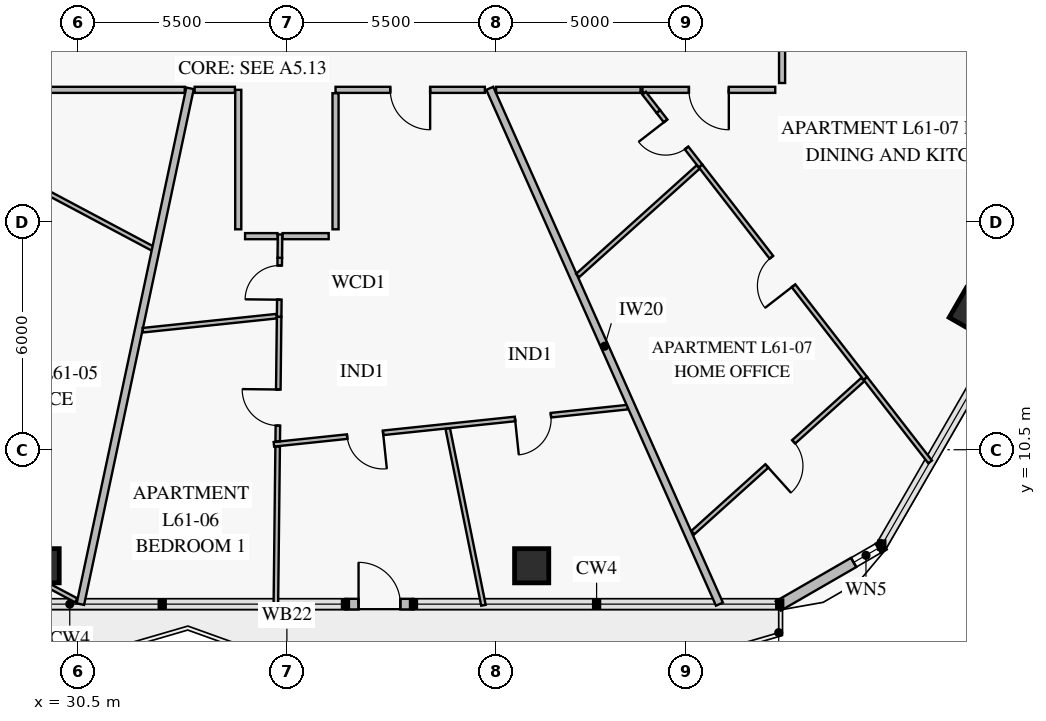
"""IFC4 building model, lengths in metres.
Left out: names, types, materials, properties, quantities, classifications, styles, units other than length and angle.
Written with IfcOpenShell. Run it as: python <this file> out.ifc"""

import sys

from ifc_helpers import new_model, si_unit, direction, frame, frame_2d, origin, origin_2d, place, context, subcontext, project, spatial, rectangle, extrude, element, fill, save


model = new_model("IFC4")
c1 = context("Model", 3, precision=1e-05, world=origin(), true_north=direction((0.0, 1.0)))
c2 = subcontext(c1, "Body", "Model", "MODEL_VIEW")
j1 = project(units=[si_unit("LENGTHUNIT", "METRE"), si_unit("PLANEANGLEUNIT", "RADIAN")], contexts=[c1])
p1 = place(None, origin())
s1 = spatial("IfcSite", under=j1, at=p1, CompositionType="ELEMENT")
p2 = place(p1, origin())
s2 = spatial("IfcBuilding", under=s1, at=p2, CompositionType="ELEMENT")
p3 = place(p2, frame((0.0, 0.0, 242.6)))
s3 = spatial("IfcBuildingStorey", under=s2, at=p3, CompositionType="ELEMENT", Elevation=242.6)
for number, where, z_axis, x_axis in (
    (1, (29.559, 7.446, 0.0), (0.0, 0.0, 1.0), (1.0, 0.0, 0.0)),
    (2, (42.441, 7.446, 0.0), (0.0, 0.0, 1.0), (1.0, 0.0, 0.0)),
    (3, (54.044, 14.145, 0.0), (0.0, 0.0, 1.0), (0.5, 0.866, 0.0)),
):
    element("IfcColumn", number, at=place(p3, frame(where, z_axis=z_axis, x_axis=x_axis)), inside=s3, PredefinedType="COLUMN", context=c2, shape_type="SweptSolid", body=[
        extrude(rectangle(XDim=0.9, YDim=0.9, at=origin_2d()), origin(), (0.0, 0.0, 1.0), 3.55),
    ])
p4 = place(p3, frame((51.715, 7.996, 0.0), z_axis=(0.0, 0.0, 1.0), x_axis=(-0.866028773314, -0.499994163758, 0.0)))
e4 = element("IfcWall", 4, at=p4, inside=s3, PredefinedType="SOLIDWALL", context=c2, shape_type="SweptSolid", body=[
    extrude(rectangle(XDim=3.215, YDim=0.28, at=frame_2d((1.607, 0.0))), origin(), (0.0, 0.0, 1.0), 3.55),
])
p5 = place(p4, frame((0.176, 0.0, 0.85)))
e5 = element("IfcOpeningElement", 5, at=p5, cuts=e4, PredefinedType="OPENING", context=c2, shape_type="SweptSolid", body=[
    extrude(rectangle(XDim=0.75, YDim=1.5, at=frame_2d((0.375, 0.75))), frame((0.0, 0.152, 0.0), z_axis=(0.0, -1.0, 0.0), x_axis=(1.0, 0.0, 0.0)), (0.0, 0.0, 1.0), 0.304),
])
p6 = place(p3, frame((39.331, 6.436, 0.0), z_axis=(0.0, 0.0, 1.0), x_axis=(-1.0, 0.0, 0.0)))
e6 = element("IfcWall", 6, at=p6, inside=s3, PredefinedType="SOLIDWALL", context=c2, shape_type="SweptSolid", body=[
    extrude(rectangle(XDim=1.79, YDim=0.28, at=frame_2d((0.895, 0.0))), origin(), (0.0, 0.0, 1.0), 3.55),
])
p7 = place(p6, frame((0.345, 0.0, 0.0)))
e7 = element("IfcOpeningElement", 7, at=p7, cuts=e6, PredefinedType="OPENING", context=c2, shape_type="SweptSolid", body=[
    extrude(rectangle(XDim=1.1, YDim=2.2, at=frame_2d((0.55, 1.1))), frame((0.0, 0.152, 0.0), z_axis=(0.0, -1.0, 0.0), x_axis=(1.0, 0.0, 0.0)), (0.0, 0.0, 1.0), 0.304),
])
p8 = place(p3, frame((35.658, 10.642, 0.0), z_axis=(0.0, 0.0, 1.0), x_axis=(0.994519444743, 0.104551776778, 0.0)))
e8 = element("IfcWall", 8, at=p8, inside=s3, PredefinedType="PARTITIONING", context=c2, shape_type="SweptSolid", body=[
    extrude(rectangle(XDim=9.364, YDim=0.12, at=frame_2d((4.682, 0.0))), origin(), (0.0, 0.0, 1.0), 2.95),
])
p9 = place(p8, frame((1.939, 0.0, 0.0)))
e9 = element("IfcOpeningElement", 9, at=p9, cuts=e8, PredefinedType="OPENING", context=c2, shape_type="SweptSolid", body=[
    extrude(rectangle(XDim=0.95, YDim=2.1, at=frame_2d((0.475, 1.05))), frame((0.0, 0.072, 0.0), z_axis=(0.0, -1.0, 0.0), x_axis=(1.0, 0.0, 0.0)), (0.0, 0.0, 1.0), 0.144),
])
p10 = place(p8, frame((6.38, 0.0, 0.0)))
e10 = element("IfcOpeningElement", 10, at=p10, cuts=e8, PredefinedType="OPENING", context=c2, shape_type="SweptSolid", body=[
    extrude(rectangle(XDim=0.95, YDim=2.1, at=frame_2d((0.475, 1.05))), frame((0.0, 0.072, 0.0), z_axis=(0.0, -1.0, 0.0), x_axis=(1.0, 0.0, 0.0)), (0.0, 0.0, 1.0), 0.144),
])
p11 = place(p3, frame((35.813, 15.55, 0.0), z_axis=(0.0, 0.0, 1.0), x_axis=(-0.011312915226, -0.999936006927, 0.0)))
e11 = element("IfcWall", 11, at=p11, inside=s3, PredefinedType="PARTITIONING", context=c2, shape_type="SweptSolid", body=[
    extrude(rectangle(XDim=1.554, YDim=0.12, at=frame_2d((0.777, 0.0))), origin(), (0.0, 0.0, 1.0), 3.15),
])
p12 = place(p11, frame((0.203, 0.0, 0.0)))
e12 = element("IfcOpeningElement", 12, at=p12, cuts=e11, PredefinedType="OPENING", context=c2, shape_type="SweptSolid", body=[
    extrude(rectangle(XDim=0.9, YDim=2.1, at=frame_2d((0.45, 1.05))), frame((0.0, 0.072, 0.0), z_axis=(0.0, -1.0, 0.0), x_axis=(1.0, 0.0, 0.0)), (0.0, 0.0, 1.0), 0.144),
])
p13 = place(p3, frame((35.796, 13.996, 0.0), z_axis=(0.0, 0.0, 1.0), x_axis=(-0.011329872819, -0.999935814931, 0.0)))
e13 = element("IfcWall", 13, at=p13, inside=s3, PredefinedType="PARTITIONING", context=c2, shape_type="SweptSolid", body=[
    extrude(rectangle(XDim=3.275, YDim=0.12, at=frame_2d((1.638, 0.0))), origin(), (0.0, 0.0, 1.0), 3.55),
])
p14 = place(p13, frame((1.912, 0.0, 0.0)))
e14 = element("IfcOpeningElement", 14, at=p14, cuts=e13, PredefinedType="OPENING", context=c2, shape_type="SweptSolid", body=[
    extrude(rectangle(XDim=0.95, YDim=2.1, at=frame_2d((0.475, 1.05))), frame((0.0, 0.072, 0.0), z_axis=(0.0, -1.0, 0.0), x_axis=(1.0, 0.0, 0.0)), (0.0, 0.0, 1.0), 0.144),
])
p15 = place(p3, frame((35.757, 10.584, 0.0), z_axis=(0.0, 0.0, 1.0), x_axis=(-0.011345536626, -0.999935637328, 0.0)))
e15 = element("IfcWall", 15, at=p15, inside=s3, PredefinedType="PARTITIONING", context=c2, shape_type="SweptSolid", body=[
    extrude(rectangle(XDim=4.153, YDim=0.12, at=frame_2d((2.077, 0.0))), origin(), (0.0, 0.0, 1.0), 2.93),
])
p16 = place(p3, frame((37.28, 19.97, 0.0), z_axis=(0.0, 0.0, 1.0), x_axis=(1.0, 0.0, 0.0)))
e16 = element("IfcWall", 16, at=p16, inside=s3, PredefinedType="PARTITIONING", context=c2, shape_type="SweptSolid", body=[
    extrude(rectangle(XDim=3.929, YDim=0.16, at=frame_2d((1.964, 0.0))), origin(), (0.0, 0.0, 1.0), 2.95),
])
p17 = place(p16, frame((1.439, 0.0, 0.0)))
e17 = element("IfcOpeningElement", 17, at=p17, cuts=e16, PredefinedType="OPENING", context=c2, shape_type="SweptSolid", body=[
    extrude(rectangle(XDim=1.05, YDim=2.15, at=frame_2d((0.525, 1.075))), frame((0.0, 0.092, 0.0), z_axis=(0.0, -1.0, 0.0), x_axis=(1.0, 0.0, 0.0)), (0.0, 0.0, 1.0), 0.184),
])
p18 = place(p3, frame((45.773, 19.4, 0.0), z_axis=(0.0, 0.0, 1.0), x_axis=(0.612972513082, -0.790104232495, 0.0)))
e18 = element("IfcWall", 18, at=p18, inside=s3, PredefinedType="PARTITIONING", context=c2, shape_type="SweptSolid", body=[
    extrude(rectangle(XDim=1.817, YDim=0.12, at=frame_2d((0.908, 0.0))), origin(), (0.0, 0.0, 1.0), 3.55),
])
p19 = place(p18, frame((0.313, 0.0, 0.0)))
e19 = element("IfcOpeningElement", 19, at=p19, cuts=e18, PredefinedType="OPENING", context=c2, shape_type="SweptSolid", body=[
    extrude(rectangle(XDim=0.9, YDim=2.1, at=frame_2d((0.45, 1.05))), frame((0.0, 0.072, 0.0), z_axis=(0.0, -1.0, 0.0), x_axis=(1.0, 0.0, 0.0)), (0.0, 0.0, 1.0), 0.144),
])
p20 = place(p3, frame((46.887, 17.965, 0.0), z_axis=(0.0, 0.0, 1.0), x_axis=(0.612896077685, -0.790163526087, 0.0)))
e20 = element("IfcWall", 20, at=p20, inside=s3, PredefinedType="PARTITIONING", context=c2, shape_type="SweptSolid", body=[
    extrude(rectangle(XDim=7.075, YDim=0.12, at=frame_2d((3.538, 0.0))), origin(), (0.0, 0.0, 1.0), 2.93),
])
p21 = place(p20, frame((3.038, 0.0, 0.0)))
e21 = element("IfcOpeningElement", 21, at=p21, cuts=e20, PredefinedType="OPENING", context=c2, shape_type="SweptSolid", body=[
    extrude(rectangle(XDim=0.95, YDim=2.1, at=frame_2d((0.475, 1.05))), frame((0.0, 0.072, 0.0), z_axis=(0.0, -1.0, 0.0), x_axis=(1.0, 0.0, 0.0)), (0.0, 0.0, 1.0), 0.144),
])
p22 = place(p3, frame((46.682, 8.319, 0.0), z_axis=(0.0, 0.0, 1.0), x_axis=(0.743153013224, 0.669121512834, 0.0)))
e22 = element("IfcWall", 22, at=p22, inside=s3, PredefinedType="PARTITIONING", context=c2, shape_type="SweptSolid", body=[
    extrude(rectangle(XDim=6.022, YDim=0.12, at=frame_2d((3.011, 0.0))), origin(), (0.0, 0.0, 1.0), 2.93),
])
p23 = place(p22, frame((2.62, 0.0, 0.0)))
e23 = element("IfcOpeningElement", 23, at=p23, cuts=e22, PredefinedType="OPENING", context=c2, shape_type="SweptSolid", body=[
    extrude(rectangle(XDim=0.95, YDim=2.1, at=frame_2d((0.475, 1.05))), frame((0.0, 0.072, 0.0), z_axis=(0.0, -1.0, 0.0), x_axis=(1.0, 0.0, 0.0)), (0.0, 0.0, 1.0), 0.144),
])
p24 = place(p3, frame((45.357, 19.97, 0.0), z_axis=(0.0, 0.0, 1.0), x_axis=(1.0, 0.0, 0.0)))
e24 = element("IfcWall", 24, at=p24, inside=s3, PredefinedType="PARTITIONING", context=c2, shape_type="SweptSolid", body=[
    extrude(rectangle(XDim=3.493, YDim=0.16, at=frame_2d((1.747, 0.0))), origin(), (0.0, 0.0, 1.0), 2.95),
])
p25 = place(p24, frame((1.222, 0.0, 0.0)))
e25 = element("IfcOpeningElement", 25, at=p25, cuts=e24, PredefinedType="OPENING", context=c2, shape_type="SweptSolid", body=[
    extrude(rectangle(XDim=1.05, YDim=2.15, at=frame_2d((0.525, 1.075))), frame((0.0, 0.092, 0.0), z_axis=(0.0, -1.0, 0.0), x_axis=(1.0, 0.0, 0.0)), (0.0, 0.0, 1.0), 0.184),
])
p26 = place(p3, frame((27.647, 18.357, 0.0), z_axis=(0.0, 0.0, 1.0), x_axis=(0.882946751735, -0.469473144706, 0.0)))
e26 = element("IfcWall", 26, at=p26, inside=s3, PredefinedType="PARTITIONING", context=c2, shape_type="SweptSolid", body=[
    extrude(rectangle(XDim=5.502, YDim=0.12, at=frame_2d((2.751, 0.0))), origin(), (0.0, 0.0, 1.0), 2.95),
])
p27 = place(p3, frame((29.629, 6.976, 0.0), z_axis=(0.0, 0.0, 1.0), x_axis=(0.883014643107, -0.46934543788, 0.0)))
e27 = element("IfcWall", 27, at=p27, inside=s3, PredefinedType="PARTITIONING", context=c2, shape_type="SweptSolid", body=[
    extrude(rectangle(XDim=0.938, YDim=0.12, at=frame_2d((0.469, 0.0))), origin(), (0.0, 0.0, 1.0), 3.55),
])
p28 = place(p3, frame((33.451, 20.01, 0.0), z_axis=(0.0, 0.0, 1.0), x_axis=(-0.207899576005, -0.978150175738, 0.0)))
e28 = element("IfcWall", 28, at=p28, inside=s3, PredefinedType="PARTITIONING", context=c2, shape_type="SweptSolid", body=[
    extrude(rectangle(XDim=13.877, YDim=0.2, at=frame_2d((6.938, 0.0))), origin(), (0.0, 0.0, 1.0), 2.93),
])
p29 = place(p3, frame((40.233, 11.055, 0.0), z_axis=(0.0, 0.0, 1.0), x_axis=(0.198056275703, -0.980190650667, 0.0)))
e29 = element("IfcWall", 29, at=p29, inside=s3, PredefinedType="PARTITIONING", context=c2, shape_type="SweptSolid", body=[
    extrude(rectangle(XDim=4.742, YDim=0.12, at=frame_2d((2.371, 0.0))), origin(), (0.0, 0.0, 1.0), 2.93),
])
p30 = place(p3, frame((35.82, 16.165, 0.0), z_axis=(0.0, 0.0, 1.0), x_axis=(-0.011511742117, -0.999933737701, 0.0)))
e30 = element("IfcWall", 30, at=p30, inside=s3, PredefinedType="PARTITIONING", context=c2, shape_type="SweptSolid", body=[
    extrude(rectangle(XDim=0.615, YDim=0.12, at=frame_2d((0.308, 0.0))), origin(), (0.0, 0.0, 1.0), 3.55),
])
p31 = place(p3, frame((32.209, 13.645, 0.0), z_axis=(0.0, 0.0, 1.0), x_axis=(0.99452169774, 0.10453034356, 0.0)))
e31 = element("IfcWall", 31, at=p31, inside=s3, PredefinedType="PARTITIONING", context=c2, shape_type="SweptSolid", body=[
    extrude(rectangle(XDim=3.538, YDim=0.12, at=frame_2d((1.769, 0.0))), origin(), (0.0, 0.0, 1.0), 3.55),
])
p32 = place(p3, frame((41.338, 20.01, 0.0), z_axis=(0.0, 0.0, 1.0), x_axis=(0.406725337387, -0.913550491176, 0.0)))
e32 = element("IfcWall", 32, at=p32, inside=s3, PredefinedType="PARTITIONING", context=c2, shape_type="SweptSolid", body=[
    extrude(rectangle(XDim=14.858, YDim=0.2, at=frame_2d((7.429, 0.0))), origin(), (0.0, 0.0, 1.0), 2.93),
])
p33 = place(p3, frame((45.4, 19.882, 0.0), z_axis=(0.0, 0.0, 1.0), x_axis=(0.612665415135, -0.790342387258, 0.0)))
e33 = element("IfcWall", 33, at=p33, inside=s3, PredefinedType="PARTITIONING", context=c2, shape_type="SweptSolid", body=[
    extrude(rectangle(XDim=0.61, YDim=0.12, at=frame_2d((0.305, 0.0))), origin(), (0.0, 0.0, 1.0), 3.55),
])
p34 = place(p3, frame((51.223, 12.374, 0.0), z_axis=(0.0, 0.0, 1.0), x_axis=(0.612844799687, -0.790203297574, 0.0)))
e34 = element("IfcWall", 34, at=p34, inside=s3, PredefinedType="PARTITIONING", context=c2, shape_type="SweptSolid", body=[
    extrude(rectangle(XDim=2.778, YDim=0.12, at=frame_2d((1.389, 0.0))), origin(), (0.0, 0.0, 1.0), 3.55),
])
p35 = place(p3, frame((43.65, 15.083, 0.0), z_axis=(0.0, 0.0, 1.0), x_axis=(0.743154729862, 0.669119606262, 0.0)))
e35 = element("IfcWall", 35, at=p35, inside=s3, PredefinedType="PARTITIONING", context=c2, shape_type="SweptSolid", body=[
    extrude(rectangle(XDim=4.267, YDim=0.12, at=frame_2d((2.134, 0.0))), origin(), (0.0, 0.0, 1.0), 3.55),
])
p36 = place(p3, frame((46.808, 25.76, 0.0), z_axis=(0.0, 0.0, 1.0), x_axis=(0.86602399778, -0.500002435262, 0.0)))
e36 = element("IfcWall", 36, at=p36, inside=s3, PredefinedType="PARTITIONING", context=c2, shape_type="SweptSolid", body=[
    extrude(rectangle(XDim=13.083, YDim=0.2, at=frame_2d((6.542, 0.0))), origin(), (0.0, 0.0, 1.0), 2.93),
])
p37 = place(p3, frame((28.588, 19.97, 0.0), z_axis=(0.0, 0.0, 1.0), x_axis=(1.0, 0.0, 0.0)))
e37 = element("IfcWall", 37, at=p37, inside=s3, PredefinedType="PARTITIONING", context=c2, shape_type="SweptSolid", body=[
    extrude(rectangle(XDim=4.725, YDim=0.16, at=frame_2d((2.362, 0.0))), origin(), (0.0, 0.0, 1.0), 2.95),
])
p38 = place(p3, frame((37.28, 16.3, 0.0), z_axis=(0.0, 0.0, 1.0), x_axis=(0.0, 1.0, 0.0)))
e38 = element("IfcWall", 38, at=p38, inside=s3, PredefinedType="PARTITIONING", context=c2, shape_type="SweptSolid", body=[
    extrude(rectangle(XDim=3.582, YDim=0.16, at=frame_2d((1.791, 0.0))), origin(), (0.0, 0.0, 1.0), 3.55),
])
p39 = place(p3, frame((35.888, 16.12, 0.0), z_axis=(0.0, 0.0, 1.0), x_axis=(1.0, 0.0, 0.0)))
e39 = element("IfcWall", 39, at=p39, inside=s3, PredefinedType="PARTITIONING", context=c2, shape_type="SweptSolid", body=[
    extrude(rectangle(XDim=1.212, YDim=0.16, at=frame_2d((0.606, 0.0))), origin(), (0.0, 0.0, 1.0), 3.55),
])
p40 = place(p3, frame((34.72, 19.97, 0.0), z_axis=(0.0, 0.0, 1.0), x_axis=(0.0, -1.0, 0.0)))
e40 = element("IfcWall", 40, at=p40, inside=s3, PredefinedType="PARTITIONING", context=c2, shape_type="SweptSolid", body=[
    extrude(rectangle(XDim=3.67, YDim=0.16, at=frame_2d((1.835, 0.0))), origin(), (0.0, 0.0, 1.0), 3.55),
])
p41 = place(p3, frame((33.573, 19.97, 0.0), z_axis=(0.0, 0.0, 1.0), x_axis=(1.0, 0.0, 0.0)))
e41 = element("IfcWall", 41, at=p41, inside=s3, PredefinedType="PARTITIONING", context=c2, shape_type="SweptSolid", body=[
    extrude(rectangle(XDim=1.059, YDim=0.16, at=frame_2d((0.53, 0.0))), origin(), (0.0, 0.0, 1.0), 3.55),
])
p42 = place(p3, frame((34.9, 16.12, 0.0), z_axis=(0.0, 0.0, 1.0), x_axis=(1.0, 0.0, 0.0)))
e42 = element("IfcWall", 42, at=p42, inside=s3, PredefinedType="PARTITIONING", context=c2, shape_type="SweptSolid", body=[
    extrude(rectangle(XDim=0.852, YDim=0.16, at=frame_2d((0.426, 0.0))), origin(), (0.0, 0.0, 1.0), 3.55),
])
p43 = place(p3, frame((49.03, 20.15, 0.0), z_axis=(0.0, 0.0, 1.0), x_axis=(0.0, 1.0, 0.0)))
e43 = element("IfcWall", 43, at=p43, inside=s3, PredefinedType="PARTITIONING", context=c2, shape_type="SweptSolid", body=[
    extrude(rectangle(XDim=2.05, YDim=0.16, at=frame_2d((1.025, 0.0))), origin(), (0.0, 0.0, 1.0), 3.55),
])
p44 = place(p3, frame((41.504, 19.97, 0.0), z_axis=(0.0, 0.0, 1.0), x_axis=(1.0, 0.0, 0.0)))
e44 = element("IfcWall", 44, at=p44, inside=s3, PredefinedType="PARTITIONING", context=c2, shape_type="SweptSolid", body=[
    extrude(rectangle(XDim=3.802, YDim=0.16, at=frame_2d((1.901, 0.0))), origin(), (0.0, 0.0, 1.0), 3.55),
])
p45 = place(p5, origin())
e45 = element("IfcWindow", 45, at=p45, inside=s3, PartitioningType="SINGLE_PANEL", PredefinedType="WINDOW", context=c2, shape_type="SweptSolid", body=[
    extrude(rectangle(XDim=0.75, YDim=1.5, at=frame_2d((0.375, 0.75))), frame((0.0, 0.03, 0.0), z_axis=(0.0, -1.0, 0.0), x_axis=(1.0, 0.0, 0.0)), (0.0, 0.0, 1.0), 0.06),
])
fill(e5, e45)
p46 = place(p7, frame((1.1, 0.0, 0.0), z_axis=(0.0, 0.0, 1.0), x_axis=(-1.0, 0.0, 0.0)))
e46 = element("IfcDoor", 46, at=p46, inside=s3, OperationType="SINGLE_SWING_LEFT", PredefinedType="DOOR", context=c2, shape_type="SweptSolid", body=[
    extrude(rectangle(XDim=1.1, YDim=2.2, at=frame_2d((0.55, 1.1))), frame((0.0, 0.025, 0.0), z_axis=(0.0, -1.0, 0.0), x_axis=(1.0, 0.0, 0.0)), (0.0, 0.0, 1.0), 0.05),
])
fill(e7, e46)
p47 = place(p9, frame((0.95, 0.0, 0.0), z_axis=(0.0, 0.0, 1.0), x_axis=(-1.0, 0.0, 0.0)))
e47 = element("IfcDoor", 47, at=p47, inside=s3, OperationType="SINGLE_SWING_LEFT", PredefinedType="DOOR", context=c2, shape_type="SweptSolid", body=[
    extrude(rectangle(XDim=0.95, YDim=2.1, at=frame_2d((0.475, 1.05))), frame((0.0, 0.025, 0.0), z_axis=(0.0, -1.0, 0.0), x_axis=(1.0, 0.0, 0.0)), (0.0, 0.0, 1.0), 0.05),
])
fill(e9, e47)
p48 = place(p10, frame((0.95, 0.0, 0.0), z_axis=(0.0, 0.0, 1.0), x_axis=(-1.0, 0.0, 0.0)))
e48 = element("IfcDoor", 48, at=p48, inside=s3, OperationType="SINGLE_SWING_RIGHT", PredefinedType="DOOR", context=c2, shape_type="SweptSolid", body=[
    extrude(rectangle(XDim=0.95, YDim=2.1, at=frame_2d((0.475, 1.05))), frame((0.0, 0.025, 0.0), z_axis=(0.0, -1.0, 0.0), x_axis=(1.0, 0.0, 0.0)), (0.0, 0.0, 1.0), 0.05),
])
fill(e10, e48)
p49 = place(p12, frame((0.9, 0.0, 0.0), z_axis=(0.0, 0.0, 1.0), x_axis=(-1.0, 0.0, 0.0)))
e49 = element("IfcDoor", 49, at=p49, inside=s3, OperationType="SINGLE_SWING_LEFT", PredefinedType="DOOR", context=c2, shape_type="SweptSolid", body=[
    extrude(rectangle(XDim=0.9, YDim=2.1, at=frame_2d((0.45, 1.05))), frame((0.0, 0.025, 0.0), z_axis=(0.0, -1.0, 0.0), x_axis=(1.0, 0.0, 0.0)), (0.0, 0.0, 1.0), 0.05),
])
fill(e12, e49)
p50 = place(p14, frame((0.95, 0.0, 0.0), z_axis=(0.0, 0.0, 1.0), x_axis=(-1.0, 0.0, 0.0)))
e50 = element("IfcDoor", 50, at=p50, inside=s3, OperationType="SINGLE_SWING_RIGHT", PredefinedType="DOOR", context=c2, shape_type="SweptSolid", body=[
    extrude(rectangle(XDim=0.95, YDim=2.1, at=frame_2d((0.475, 1.05))), frame((0.0, 0.025, 0.0), z_axis=(0.0, -1.0, 0.0), x_axis=(1.0, 0.0, 0.0)), (0.0, 0.0, 1.0), 0.05),
])
fill(e14, e50)
p51 = place(p17, frame((1.05, 0.0, 0.0), z_axis=(0.0, 0.0, 1.0), x_axis=(-1.0, 0.0, 0.0)))
e51 = element("IfcDoor", 51, at=p51, inside=s3, OperationType="SINGLE_SWING_LEFT", PredefinedType="DOOR", context=c2, shape_type="SweptSolid", body=[
    extrude(rectangle(XDim=1.05, YDim=2.15, at=frame_2d((0.525, 1.075))), frame((0.0, 0.025, 0.0), z_axis=(0.0, -1.0, 0.0), x_axis=(1.0, 0.0, 0.0)), (0.0, 0.0, 1.0), 0.05),
])
fill(e17, e51)
p52 = place(p19, frame((0.9, 0.0, 0.0), z_axis=(0.0, 0.0, 1.0), x_axis=(-1.0, 0.0, 0.0)))
e52 = element("IfcDoor", 52, at=p52, inside=s3, OperationType="SINGLE_SWING_RIGHT", PredefinedType="DOOR", context=c2, shape_type="SweptSolid", body=[
    extrude(rectangle(XDim=0.9, YDim=2.1, at=frame_2d((0.45, 1.05))), frame((0.0, 0.025, 0.0), z_axis=(0.0, -1.0, 0.0), x_axis=(1.0, 0.0, 0.0)), (0.0, 0.0, 1.0), 0.05),
])
fill(e19, e52)
p53 = place(p21, frame((0.95, 0.0, 0.0), z_axis=(0.0, 0.0, 1.0), x_axis=(-1.0, 0.0, 0.0)))
e53 = element("IfcDoor", 53, at=p53, inside=s3, OperationType="SINGLE_SWING_LEFT", PredefinedType="DOOR", context=c2, shape_type="SweptSolid", body=[
    extrude(rectangle(XDim=0.95, YDim=2.1, at=frame_2d((0.475, 1.05))), frame((0.0, 0.025, 0.0), z_axis=(0.0, -1.0, 0.0), x_axis=(1.0, 0.0, 0.0)), (0.0, 0.0, 1.0), 0.05),
])
fill(e21, e53)
p54 = place(p23, frame((0.95, 0.0, 0.0), z_axis=(0.0, 0.0, 1.0), x_axis=(-1.0, 0.0, 0.0)))
e54 = element("IfcDoor", 54, at=p54, inside=s3, OperationType="SINGLE_SWING_RIGHT", PredefinedType="DOOR", context=c2, shape_type="SweptSolid", body=[
    extrude(rectangle(XDim=0.95, YDim=2.1, at=frame_2d((0.475, 1.05))), frame((0.0, 0.025, 0.0), z_axis=(0.0, -1.0, 0.0), x_axis=(1.0, 0.0, 0.0)), (0.0, 0.0, 1.0), 0.05),
])
fill(e23, e54)
p55 = place(p25, frame((1.05, 0.0, 0.0), z_axis=(0.0, 0.0, 1.0), x_axis=(-1.0, 0.0, 0.0)))
e55 = element("IfcDoor", 55, at=p55, inside=s3, OperationType="SINGLE_SWING_LEFT", PredefinedType="DOOR", context=c2, shape_type="SweptSolid", body=[
    extrude(rectangle(XDim=1.05, YDim=2.15, at=frame_2d((0.525, 1.075))), frame((0.0, 0.025, 0.0), z_axis=(0.0, -1.0, 0.0), x_axis=(1.0, 0.0, 0.0)), (0.0, 0.0, 1.0), 0.05),
])
fill(e25, e55)
save(model, sys.argv[1])
